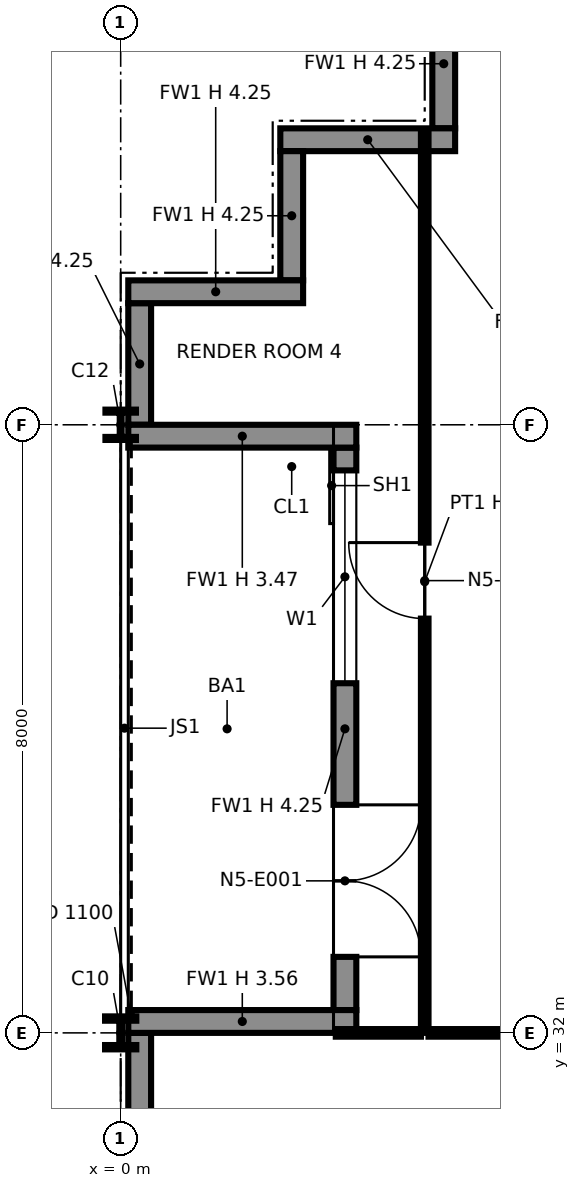
"""IFC4 building model, lengths in metres.
Left out: names, types, materials, properties, quantities, classifications, styles, units other than length and angle.
Written with IfcOpenShell. Run it as: python <this file> out.ifc"""

import sys

from ifc_helpers import new_model, si_unit, direction, frame, frame_2d, origin, origin_2d, place, context, subcontext, project, spatial, polyline, rectangle, i_section, outline, extrude, element, fill, save


model = new_model("IFC4")
c1 = context("Model", 3, precision=1e-05, world=origin(), true_north=direction((0.0, 1.0)))
c2 = subcontext(c1, "Body", "Model", "MODEL_VIEW")
j1 = project(units=[si_unit("LENGTHUNIT", "METRE"), si_unit("PLANEANGLEUNIT", "RADIAN")], contexts=[c1])
p1 = place(None, origin())
s1 = spatial("IfcSite", under=j1, at=p1, CompositionType="ELEMENT")
p2 = place(p1, origin())
s2 = spatial("IfcBuilding", under=s1, at=p2, CompositionType="ELEMENT")
p3 = place(p2, frame((0.0, 0.0, 92.0)))
s3 = spatial("IfcBuildingStorey", under=s2, at=p3, CompositionType="ELEMENT", Elevation=92.0)
p4 = place(p3, frame((0.0, 32.0, 0.0), z_axis=(0.0, 0.0, 1.0), x_axis=(1.0, 0.0, 0.0)))
e1 = element("IfcColumn", 1, at=p4, inside=s3, PredefinedType="COLUMN", context=c2, shape_type="SweptSolid", body=[
    extrude(i_section(OverallWidth=0.411, OverallDepth=0.434, WebThickness=0.036, FlangeThickness=0.057, at=origin_2d()), origin(), (0.0, 0.0, 1.0), 4.25),
])
p5 = place(p3, frame((0.0, 40.0, 0.0), z_axis=(0.0, 0.0, 1.0), x_axis=(1.0, 0.0, 0.0)))
e2 = element("IfcColumn", 2, at=p5, inside=s3, PredefinedType="COLUMN", context=c2, shape_type="SweptSolid", body=[
    extrude(i_section(OverallWidth=0.401, OverallDepth=0.399, WebThickness=0.025, FlangeThickness=0.04, at=origin_2d()), origin(), (0.0, 0.0, 1.0), 4.25),
])
p6 = place(p3, frame((0.25, 41.6, 0.0), z_axis=(0.0, 0.0, 1.0), x_axis=(0.0, -1.0, 0.0)))
e3 = element("IfcWall", 3, at=p6, inside=s3, PredefinedType="SOLIDWALL", context=c2, shape_type="SweptSolid", body=[
    extrude(rectangle(XDim=1.6, YDim=0.3, at=frame_2d((0.8, 0.0))), origin(), (0.0, 0.0, 1.0), 4.25),
])
p7 = place(p3, frame((2.95, 39.7, 0.0), z_axis=(0.0, 0.0, 1.0), x_axis=(0.0, -1.0, 0.0)))
e4 = element("IfcWall", 4, at=p7, inside=s3, PredefinedType="SOLIDWALL", context=c2, shape_type="SweptSolid", body=[
    extrude(rectangle(XDim=7.4, YDim=0.3, at=frame_2d((3.7, 0.0))), origin(), (0.0, 0.0, 1.0), 4.25),
])
p8 = place(p7, frame((0.3, 0.0, 0.9)))
e5 = element("IfcOpeningElement", 5, at=p8, cuts=e4, PredefinedType="OPENING", context=c2, shape_type="SweptSolid", body=[
    extrude(rectangle(XDim=2.8, YDim=2.2, at=frame_2d((1.4, 1.1))), frame((0.0, 0.16, 0.0), z_axis=(0.0, -1.0, 0.0), x_axis=(1.0, 0.0, 0.0)), (0.0, 0.0, 1.0), 0.32),
])
p9 = place(p7, frame((4.7, 0.0, 0.0)))
e6 = element("IfcOpeningElement", 6, at=p9, cuts=e4, PredefinedType="OPENING", context=c2, shape_type="SweptSolid", body=[
    extrude(rectangle(XDim=2.0, YDim=2.4, at=frame_2d((1.0, 1.2))), frame((0.0, 0.16, 0.0), z_axis=(0.0, -1.0, 0.0), x_axis=(1.0, 0.0, 0.0)), (0.0, 0.0, 1.0), 0.32),
])
p10 = place(p3, frame((0.1, 39.85, 0.0), z_axis=(0.0, 0.0, 1.0), x_axis=(1.0, 0.0, 0.0)))
e7 = element("IfcWall", 7, at=p10, inside=s3, PredefinedType="SOLIDWALL", context=c2, shape_type="SweptSolid", body=[
    extrude(rectangle(XDim=3.0, YDim=0.3, at=frame_2d((1.5, 0.0))), origin(), (0.0, 0.0, 1.0), 3.469),
])
p11 = place(p3, frame((0.1, 32.15, 0.0), z_axis=(0.0, 0.0, 1.0), x_axis=(1.0, 0.0, 0.0)))
e8 = element("IfcWall", 8, at=p11, inside=s3, PredefinedType="SOLIDWALL", context=c2, shape_type="SweptSolid", body=[
    extrude(rectangle(XDim=3.0, YDim=0.3, at=frame_2d((1.5, 0.0))), origin(), (0.0, 0.0, 1.0), 3.556),
])
p12 = place(p3, frame((0.25, 32.0, 0.0), z_axis=(0.0, 0.0, 1.0), x_axis=(0.0, -1.0, 0.0)))
e9 = element("IfcWall", 9, at=p12, inside=s3, PredefinedType="SOLIDWALL", context=c2, shape_type="SweptSolid", body=[
    extrude(rectangle(XDim=8.0, YDim=0.3, at=frame_2d((4.0, 0.0))), origin(), (0.0, 0.0, 1.0), 4.25),
])
p13 = place(p3, frame((4.25, 45.6, 0.0), z_axis=(0.0, 0.0, 1.0), x_axis=(0.0, -1.0, 0.0)))
e10 = element("IfcWall", 10, at=p13, inside=s3, PredefinedType="SOLIDWALL", context=c2, shape_type="SweptSolid", body=[
    extrude(rectangle(XDim=1.7, YDim=0.3, at=frame_2d((0.85, 0.0))), origin(), (0.0, 0.0, 1.0), 4.25),
])
p14 = place(p3, frame((4.4, 43.75, 0.0), z_axis=(0.0, 0.0, 1.0), x_axis=(-1.0, 0.0, 0.0)))
e11 = element("IfcWall", 11, at=p14, inside=s3, PredefinedType="SOLIDWALL", context=c2, shape_type="SweptSolid", body=[
    extrude(rectangle(XDim=2.3, YDim=0.3, at=frame_2d((1.15, 0.0))), origin(), (0.0, 0.0, 1.0), 4.25),
])
p15 = place(p3, frame((2.25, 43.6, 0.0), z_axis=(0.0, 0.0, 1.0), x_axis=(0.0, -1.0, 0.0)))
e12 = element("IfcWall", 12, at=p15, inside=s3, PredefinedType="SOLIDWALL", context=c2, shape_type="SweptSolid", body=[
    extrude(rectangle(XDim=1.7, YDim=0.3, at=frame_2d((0.85, 0.0))), origin(), (0.0, 0.0, 1.0), 4.25),
])
p16 = place(p3, frame((2.4, 41.75, 0.0), z_axis=(0.0, 0.0, 1.0), x_axis=(-1.0, 0.0, 0.0)))
e13 = element("IfcWall", 13, at=p16, inside=s3, PredefinedType="SOLIDWALL", context=c2, shape_type="SweptSolid", body=[
    extrude(rectangle(XDim=2.3, YDim=0.3, at=frame_2d((1.15, 0.0))), origin(), (0.0, 0.0, 1.0), 4.25),
])
p17 = place(p3, frame((2.83, 32.0, 0.0), z_axis=(0.0, 0.0, 1.0), x_axis=(1.0, 0.0, 0.0)))
e14 = element("IfcWall", 14, at=p17, inside=s3, PredefinedType="PARTITIONING", context=c2, shape_type="SweptSolid", body=[
    extrude(rectangle(XDim=1.12, YDim=0.1, at=frame_2d((0.56, 0.0))), origin(), (0.0, 0.0, 1.0), 3.47),
])
p18 = place(p3, frame((4.05, 32.0, 0.0), z_axis=(0.0, 0.0, 1.0), x_axis=(1.0, 0.0, 0.0)))
e15 = element("IfcWall", 15, at=p18, inside=s3, PredefinedType="PARTITIONING", context=c2, shape_type="SweptSolid", body=[
    extrude(rectangle(XDim=3.92, YDim=0.1, at=frame_2d((1.96, 0.0))), origin(), (0.0, 0.0, 1.0), 3.47),
])
p19 = place(p3, frame((4.0, 32.0, 0.0), z_axis=(0.0, 0.0, 1.0), x_axis=(0.0, 1.0, 0.0)))
e16 = element("IfcWall", 16, at=p19, inside=s3, PredefinedType="PARTITIONING", context=c2, shape_type="SweptSolid", body=[
    extrude(outline(polyline([(0.0, 0.0), (11.87, 0.0), (11.87, 4.25), (8.3, 4.25), (8.298, 3.47), (7.702, 3.47), (7.7, 4.25), (4.3, 4.25), (4.298, 3.47), (3.702, 3.47), (3.7, 4.25), (0.0, 4.25), (0.0, 0.0)])), frame((0.0, 0.05, 0.0), z_axis=(0.0, -1.0, 0.0), x_axis=(1.0, 0.0, 0.0)), (0.0, 0.0, 1.0), 0.1),
])
p20 = place(p19, frame((5.45, 0.0, 0.0)))
e17 = element("IfcOpeningElement", 17, at=p20, cuts=e16, PredefinedType="OPENING", context=c2, shape_type="SweptSolid", body=[
    extrude(rectangle(XDim=1.0, YDim=2.1, at=frame_2d((0.5, 1.05))), frame((0.0, 0.06, 0.0), z_axis=(0.0, -1.0, 0.0), x_axis=(1.0, 0.0, 0.0)), (0.0, 0.0, 1.0), 0.12),
])
p21 = place(p8, origin())
e18 = element("IfcWindow", 18, at=p21, inside=s3, PartitioningType="SINGLE_PANEL", PredefinedType="WINDOW", context=c2, shape_type="SweptSolid", body=[
    extrude(rectangle(XDim=2.8, YDim=2.2, at=frame_2d((1.4, 1.1))), frame((0.0, 0.03, 0.0), z_axis=(0.0, -1.0, 0.0), x_axis=(1.0, 0.0, 0.0)), (0.0, 0.0, 1.0), 0.06),
])
fill(e5, e18)
p22 = place(p9, origin())
e19 = element("IfcDoor", 19, at=p22, inside=s3, OperationType="DOUBLE_DOOR_SINGLE_SWING", PredefinedType="DOOR", context=c2, shape_type="SweptSolid", body=[
    extrude(rectangle(XDim=2.0, YDim=2.4, at=frame_2d((1.0, 1.2))), frame((0.0, 0.025, 0.0), z_axis=(0.0, -1.0, 0.0), x_axis=(1.0, 0.0, 0.0)), (0.0, 0.0, 1.0), 0.05),
])
fill(e6, e19)
p23 = place(p20, origin())
e20 = element("IfcDoor", 20, at=p23, inside=s3, OperationType="SINGLE_SWING_RIGHT", PredefinedType="DOOR", context=c2, shape_type="SweptSolid", body=[
    extrude(rectangle(XDim=1.0, YDim=2.1, at=frame_2d((0.5, 1.05))), frame((0.0, 0.025, 0.0), z_axis=(0.0, -1.0, 0.0), x_axis=(1.0, 0.0, 0.0)), (0.0, 0.0, 1.0), 0.05),
])
fill(e17, e20)
save(model, sys.argv[1])
